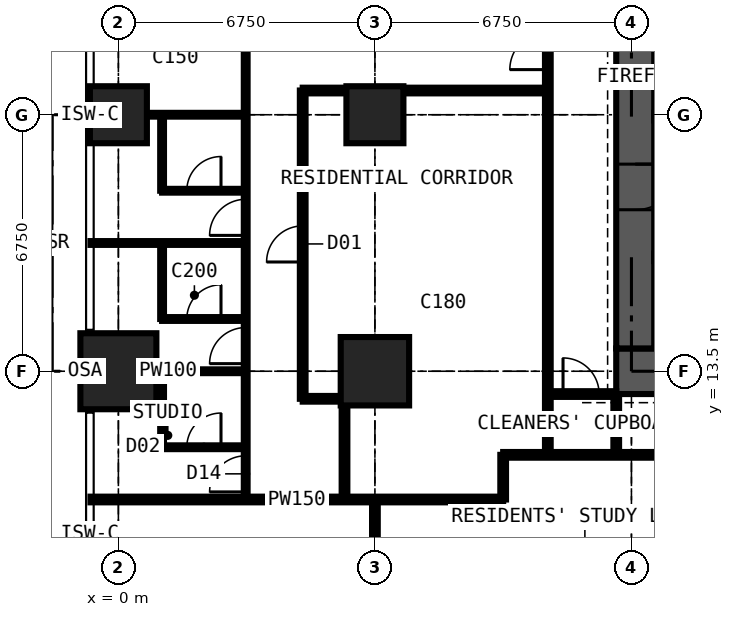
"""IFC4 building model, lengths in metres.
Left out: names, types, materials, properties, quantities, classifications, styles, units other than length and angle.
Written with IfcOpenShell. Run it as: python <this file> out.ifc"""

import sys

from ifc_helpers import new_model, si_unit, direction, frame, frame_2d, origin, origin_2d, place, context, subcontext, project, spatial, rectangle, extrude, element, fill, save


model = new_model("IFC4")
c1 = context("Model", 3, precision=1e-05, world=origin(), true_north=direction((0.0, 1.0)))
c2 = subcontext(c1, "Body", "Model", "MODEL_VIEW")
j1 = project(units=[si_unit("LENGTHUNIT", "METRE"), si_unit("PLANEANGLEUNIT", "RADIAN")], contexts=[c1])
p1 = place(None, origin())
s1 = spatial("IfcSite", under=j1, at=p1, CompositionType="ELEMENT")
p2 = place(p1, origin())
s2 = spatial("IfcBuilding", under=s1, at=p2, CompositionType="ELEMENT")
p3 = place(p2, frame((0.0, 0.0, 145.8)))
s3 = spatial("IfcBuildingStorey", under=s2, at=p3, CompositionType="ELEMENT", Elevation=145.8)
p4 = place(p3, frame((0.0, 13.5, 0.0), z_axis=(0.0, 0.0, 1.0), x_axis=(1.0, 0.0, 0.0)))
e1 = element("IfcColumn", 1, at=p4, inside=s3, PredefinedType="COLUMN", context=c2, shape_type="SweptSolid", body=[
    extrude(rectangle(XDim=2.0, YDim=2.0, at=origin_2d()), origin(), (0.0, 0.0, 1.0), 3.6),
])
p5 = place(p3, frame((0.0, 20.25, 0.0), z_axis=(0.0, 0.0, 1.0), x_axis=(1.0, 0.0, 0.0)))
e2 = element("IfcColumn", 2, at=p5, inside=s3, PredefinedType="COLUMN", context=c2, shape_type="SweptSolid", body=[
    extrude(rectangle(XDim=1.5, YDim=1.5, at=origin_2d()), origin(), (0.0, 0.0, 1.0), 3.6),
])
p6 = place(p3, frame((6.75, 13.5, 0.0), z_axis=(0.0, 0.0, 1.0), x_axis=(1.0, 0.0, 0.0)))
e3 = element("IfcColumn", 3, at=p6, inside=s3, PredefinedType="COLUMN", context=c2, shape_type="SweptSolid", body=[
    extrude(rectangle(XDim=1.8, YDim=1.8, at=origin_2d()), origin(), (0.0, 0.0, 1.0), 3.6),
])
p7 = place(p3, frame((6.75, 20.25, 0.0), z_axis=(0.0, 0.0, 1.0), x_axis=(1.0, 0.0, 0.0)))
e4 = element("IfcColumn", 4, at=p7, inside=s3, PredefinedType="COLUMN", context=c2, shape_type="SweptSolid", body=[
    extrude(rectangle(XDim=1.5, YDim=1.5, at=origin_2d()), origin(), (0.0, 0.0, 1.0), 3.6),
])
p8 = place(p3, frame((13.1, 13.5, 0.0), z_axis=(0.0, 0.0, 1.0), x_axis=(1.0, 0.0, 0.0)))
e5 = element("IfcWall", 5, at=p8, inside=s3, PredefinedType="SHEAR", context=c2, shape_type="SweptSolid", body=[
    extrude(rectangle(XDim=14.3, YDim=1.2, at=frame_2d((7.15, 0.0))), origin(), (0.0, 0.0, 1.0), 3.6),
])
p9 = place(p3, frame((13.6, 26.4, 0.0), z_axis=(0.0, 0.0, 1.0), x_axis=(0.0, -1.0, 0.0)))
e6 = element("IfcWall", 6, at=p9, inside=s3, PredefinedType="SHEAR", context=c2, shape_type="SweptSolid", body=[
    extrude(rectangle(XDim=12.3, YDim=1.0, at=frame_2d((6.15, 0.0))), origin(), (0.0, 0.0, 1.0), 3.6),
])
p10 = place(p9, frame((7.45, 0.0, 0.0)))
e7 = element("IfcOpeningElement", 7, at=p10, cuts=e6, PredefinedType="OPENING", context=c2, shape_type="SweptSolid", body=[
    extrude(rectangle(XDim=1.2, YDim=2.2, at=frame_2d((0.6, 1.1))), frame((0.0, 0.51, 0.0), z_axis=(0.0, -1.0, 0.0), x_axis=(1.0, 0.0, 0.0)), (0.0, 0.0, 1.0), 1.02),
])
p11 = place(p3, frame((-0.734, 10.125, 0.0), z_axis=(0.0, 0.0, 1.0), x_axis=(1.0, 0.0, 0.0)))
e8 = element("IfcWall", 8, at=p11, inside=s3, PredefinedType="PARTITIONING", context=c2, shape_type="SweptSolid", body=[
    extrude(rectangle(XDim=10.859, YDim=0.15, at=frame_2d((5.429, 0.0))), origin(), (0.0, 0.0, 1.0), 3.375),
])
p12 = place(p3, frame((-0.734, 13.5, 0.0), z_axis=(0.0, 0.0, 1.0), x_axis=(1.0, 0.0, 0.0)))
e9 = element("IfcWall", 9, at=p12, inside=s3, PredefinedType="PARTITIONING", context=c2, shape_type="SweptSolid", body=[
    extrude(rectangle(XDim=4.084, YDim=0.1, at=frame_2d((2.042, 0.0))), origin(), (0.0, 0.0, 1.0), 2.61),
])
p13 = place(p3, frame((-0.734, 16.875, 0.0), z_axis=(0.0, 0.0, 1.0), x_axis=(1.0, 0.0, 0.0)))
e10 = element("IfcWall", 10, at=p13, inside=s3, PredefinedType="PARTITIONING", context=c2, shape_type="SweptSolid", body=[
    extrude(rectangle(XDim=4.084, YDim=0.1, at=frame_2d((2.042, 0.0))), origin(), (0.0, 0.0, 1.0), 3.375),
])
p14 = place(p3, frame((-0.734, 20.25, 0.0), z_axis=(0.0, 0.0, 1.0), x_axis=(1.0, 0.0, 0.0)))
e11 = element("IfcWall", 11, at=p14, inside=s3, PredefinedType="PARTITIONING", context=c2, shape_type="SweptSolid", body=[
    extrude(rectangle(XDim=4.084, YDim=0.1, at=frame_2d((2.042, 0.0))), origin(), (0.0, 0.0, 1.0), 2.61),
])
p15 = place(p3, frame((1.15, 11.5, 0.0), z_axis=(0.0, 0.0, 1.0), x_axis=(0.0, 1.0, 0.0)))
e12 = element("IfcWall", 12, at=p15, inside=s3, PredefinedType="PARTITIONING", context=c2, shape_type="SweptSolid", body=[
    extrude(rectangle(XDim=2.0, YDim=0.1, at=frame_2d((1.0, 0.0))), origin(), (0.0, 0.0, 1.0), 3.375),
])
p16 = place(p3, frame((1.15, 11.5, 0.0), z_axis=(0.0, 0.0, 1.0), x_axis=(1.0, 0.0, 0.0)))
e13 = element("IfcWall", 13, at=p16, inside=s3, PredefinedType="PARTITIONING", context=c2, shape_type="SweptSolid", body=[
    extrude(rectangle(XDim=2.2, YDim=0.1, at=frame_2d((1.1, 0.0))), origin(), (0.0, 0.0, 1.0), 3.375),
])
p17 = place(p16, frame((0.65, 0.0, 0.0)))
e14 = element("IfcOpeningElement", 14, at=p17, cuts=e13, PredefinedType="OPENING", context=c2, shape_type="SweptSolid", body=[
    extrude(rectangle(XDim=0.9, YDim=2.2, at=frame_2d((0.45, 1.1))), frame((0.0, 0.06, 0.0), z_axis=(0.0, -1.0, 0.0), x_axis=(1.0, 0.0, 0.0)), (0.0, 0.0, 1.0), 0.12),
])
p18 = place(p3, frame((1.15, 14.875, 0.0), z_axis=(0.0, 0.0, 1.0), x_axis=(0.0, 1.0, 0.0)))
e15 = element("IfcWall", 15, at=p18, inside=s3, PredefinedType="PARTITIONING", context=c2, shape_type="SweptSolid", body=[
    extrude(rectangle(XDim=2.0, YDim=0.1, at=frame_2d((1.0, 0.0))), origin(), (0.0, 0.0, 1.0), 3.375),
])
p19 = place(p3, frame((1.15, 14.875, 0.0), z_axis=(0.0, 0.0, 1.0), x_axis=(1.0, 0.0, 0.0)))
e16 = element("IfcWall", 16, at=p19, inside=s3, PredefinedType="PARTITIONING", context=c2, shape_type="SweptSolid", body=[
    extrude(rectangle(XDim=2.2, YDim=0.1, at=frame_2d((1.1, 0.0))), origin(), (0.0, 0.0, 1.0), 3.375),
])
p20 = place(p19, frame((0.65, 0.0, 0.0)))
e17 = element("IfcOpeningElement", 17, at=p20, cuts=e16, PredefinedType="OPENING", context=c2, shape_type="SweptSolid", body=[
    extrude(rectangle(XDim=0.9, YDim=2.2, at=frame_2d((0.45, 1.1))), frame((0.0, 0.06, 0.0), z_axis=(0.0, -1.0, 0.0), x_axis=(1.0, 0.0, 0.0)), (0.0, 0.0, 1.0), 0.12),
])
p21 = place(p3, frame((1.15, 18.25, 0.0), z_axis=(0.0, 0.0, 1.0), x_axis=(0.0, 1.0, 0.0)))
e18 = element("IfcWall", 18, at=p21, inside=s3, PredefinedType="PARTITIONING", context=c2, shape_type="SweptSolid", body=[
    extrude(rectangle(XDim=2.0, YDim=0.1, at=frame_2d((1.0, 0.0))), origin(), (0.0, 0.0, 1.0), 3.375),
])
p22 = place(p3, frame((1.15, 18.25, 0.0), z_axis=(0.0, 0.0, 1.0), x_axis=(1.0, 0.0, 0.0)))
e19 = element("IfcWall", 19, at=p22, inside=s3, PredefinedType="PARTITIONING", context=c2, shape_type="SweptSolid", body=[
    extrude(rectangle(XDim=2.2, YDim=0.1, at=frame_2d((1.1, 0.0))), origin(), (0.0, 0.0, 1.0), 3.375),
])
p23 = place(p22, frame((0.65, 0.0, 0.0)))
e20 = element("IfcOpeningElement", 20, at=p23, cuts=e19, PredefinedType="OPENING", context=c2, shape_type="SweptSolid", body=[
    extrude(rectangle(XDim=0.9, YDim=2.2, at=frame_2d((0.45, 1.1))), frame((0.0, 0.06, 0.0), z_axis=(0.0, -1.0, 0.0), x_axis=(1.0, 0.0, 0.0)), (0.0, 0.0, 1.0), 0.12),
])
p24 = place(p3, frame((3.35, 10.125, 0.0), z_axis=(0.0, 0.0, 1.0), x_axis=(0.0, 1.0, 0.0)))
e21 = element("IfcWall", 21, at=p24, inside=s3, PredefinedType="PARTITIONING", context=c2, shape_type="SweptSolid", body=[
    extrude(rectangle(XDim=16.875, YDim=0.1, at=frame_2d((8.438, 0.0))), origin(), (0.0, 0.0, 1.0), 3.375),
])
p25 = place(p24, frame((0.2, 0.0, 0.0)))
e22 = element("IfcOpeningElement", 22, at=p25, cuts=e21, PredefinedType="OPENING", context=c2, shape_type="SweptSolid", body=[
    extrude(rectangle(XDim=0.95, YDim=2.2, at=frame_2d((0.475, 1.1))), frame((0.0, 0.06, 0.0), z_axis=(0.0, -1.0, 0.0), x_axis=(1.0, 0.0, 0.0)), (0.0, 0.0, 1.0), 0.12),
])
p26 = place(p24, frame((3.575, 0.0, 0.0)))
e23 = element("IfcOpeningElement", 23, at=p26, cuts=e21, PredefinedType="OPENING", context=c2, shape_type="SweptSolid", body=[
    extrude(rectangle(XDim=0.95, YDim=2.2, at=frame_2d((0.475, 1.1))), frame((0.0, 0.06, 0.0), z_axis=(0.0, -1.0, 0.0), x_axis=(1.0, 0.0, 0.0)), (0.0, 0.0, 1.0), 0.12),
])
p27 = place(p24, frame((6.95, 0.0, 0.0)))
e24 = element("IfcOpeningElement", 24, at=p27, cuts=e21, PredefinedType="OPENING", context=c2, shape_type="SweptSolid", body=[
    extrude(rectangle(XDim=0.95, YDim=2.2, at=frame_2d((0.475, 1.1))), frame((0.0, 0.06, 0.0), z_axis=(0.0, -1.0, 0.0), x_axis=(1.0, 0.0, 0.0)), (0.0, 0.0, 1.0), 0.12),
])
p28 = place(p3, frame((4.85, 12.775, 0.0), z_axis=(0.0, 0.0, 1.0), x_axis=(0.0, 1.0, 0.0)))
e25 = element("IfcWall", 25, at=p28, inside=s3, PredefinedType="PARTITIONING", context=c2, shape_type="SweptSolid", body=[
    extrude(rectangle(XDim=8.113, YDim=0.15, at=frame_2d((4.056, 0.0))), origin(), (0.0, 0.0, 1.0), 3.375),
])
p29 = place(p28, frame((3.6, 0.0, 0.0)))
e26 = element("IfcOpeningElement", 26, at=p29, cuts=e25, PredefinedType="OPENING", context=c2, shape_type="SweptSolid", body=[
    extrude(rectangle(XDim=0.95, YDim=2.2, at=frame_2d((0.475, 1.1))), frame((0.0, 0.085, 0.0), z_axis=(0.0, -1.0, 0.0), x_axis=(1.0, 0.0, 0.0)), (0.0, 0.0, 1.0), 0.17),
])
p30 = place(p3, frame((4.85, 12.775, 0.0), z_axis=(0.0, 0.0, 1.0), x_axis=(1.0, 0.0, 0.0)))
e27 = element("IfcWall", 27, at=p30, inside=s3, PredefinedType="PARTITIONING", context=c2, shape_type="SweptSolid", body=[
    extrude(rectangle(XDim=1.1, YDim=0.15, at=frame_2d((0.55, 0.0))), origin(), (0.0, 0.0, 1.0), 3.375),
])
p31 = place(p3, frame((4.85, 20.887, 0.0), z_axis=(0.0, 0.0, 1.0), x_axis=(1.0, 0.0, 0.0)))
e28 = element("IfcWall", 28, at=p31, inside=s3, PredefinedType="PARTITIONING", context=c2, shape_type="SweptSolid", body=[
    extrude(rectangle(XDim=6.45, YDim=0.15, at=frame_2d((3.225, 0.0))), origin(), (0.0, 0.0, 1.0), 3.375),
])
p32 = place(p3, frame((5.95, 10.125, 0.0), z_axis=(0.0, 0.0, 1.0), x_axis=(0.0, 1.0, 0.0)))
e29 = element("IfcWall", 29, at=p32, inside=s3, PredefinedType="PARTITIONING", context=c2, shape_type="SweptSolid", body=[
    extrude(rectangle(XDim=2.65, YDim=0.15, at=frame_2d((1.325, 0.0))), origin(), (0.0, 0.0, 1.0), 3.375),
])
p33 = place(p3, frame((6.75, 3.35, 0.0), z_axis=(0.0, 0.0, 1.0), x_axis=(0.0, 1.0, 0.0)))
e30 = element("IfcWall", 30, at=p33, inside=s3, PredefinedType="PARTITIONING", context=c2, shape_type="SweptSolid", body=[
    extrude(rectangle(XDim=6.775, YDim=0.15, at=frame_2d((3.387, 0.0))), origin(), (0.0, 0.0, 1.0), 2.877),
])
p34 = place(p3, frame((10.125, 10.125, 0.0), z_axis=(0.0, 0.0, 1.0), x_axis=(0.0, 1.0, 0.0)))
e31 = element("IfcWall", 31, at=p34, inside=s3, PredefinedType="PARTITIONING", context=c2, shape_type="SweptSolid", body=[
    extrude(rectangle(XDim=1.175, YDim=0.15, at=frame_2d((0.587, 0.0))), origin(), (0.0, 0.0, 1.0), 3.375),
])
p35 = place(p3, frame((10.125, 11.3, 0.0), z_axis=(0.0, 0.0, 1.0), x_axis=(1.0, 0.0, 0.0)))
e32 = element("IfcWall", 32, at=p35, inside=s3, PredefinedType="PARTITIONING", context=c2, shape_type="SweptSolid", body=[
    extrude(rectangle(XDim=20.25, YDim=0.15, at=frame_2d((10.125, 0.0))), origin(), (0.0, 0.0, 1.0), 3.375),
])
p36 = place(p35, frame((8.375, 0.0, 0.0)))
e33 = element("IfcOpeningElement", 33, at=p36, cuts=e32, PredefinedType="OPENING", context=c2, shape_type="SweptSolid", body=[
    extrude(rectangle(XDim=1.0, YDim=2.2, at=frame_2d((0.5, 1.1))), frame((0.0, 0.085, 0.0), z_axis=(0.0, -1.0, 0.0), x_axis=(1.0, 0.0, 0.0)), (0.0, 0.0, 1.0), 0.17),
])
p37 = place(p35, frame((10.975, 0.0, 0.0)))
e34 = element("IfcOpeningElement", 34, at=p37, cuts=e32, PredefinedType="OPENING", context=c2, shape_type="SweptSolid", body=[
    extrude(rectangle(XDim=1.0, YDim=2.2, at=frame_2d((0.5, 1.1))), frame((0.0, 0.085, 0.0), z_axis=(0.0, -1.0, 0.0), x_axis=(1.0, 0.0, 0.0)), (0.0, 0.0, 1.0), 0.17),
])
p38 = place(p35, frame((4.875, 0.0, 0.0)))
e35 = element("IfcOpeningElement", 35, at=p38, cuts=e32, PredefinedType="OPENING", context=c2, shape_type="SweptSolid", body=[
    extrude(rectangle(XDim=0.95, YDim=2.2, at=frame_2d((0.475, 1.1))), frame((0.0, 0.085, 0.0), z_axis=(0.0, -1.0, 0.0), x_axis=(1.0, 0.0, 0.0)), (0.0, 0.0, 1.0), 0.17),
])
p39 = place(p3, frame((11.3, 11.3, 0.0), z_axis=(0.0, 0.0, 1.0), x_axis=(0.0, 1.0, 0.0)))
e36 = element("IfcWall", 36, at=p39, inside=s3, PredefinedType="PARTITIONING", context=c2, shape_type="SweptSolid", body=[
    extrude(rectangle(XDim=19.3, YDim=0.15, at=frame_2d((9.65, 0.0))), origin(), (0.0, 0.0, 1.0), 3.375),
])
p40 = place(p39, frame((18.1, 0.0, 0.0)))
e37 = element("IfcOpeningElement", 37, at=p40, cuts=e36, PredefinedType="OPENING", context=c2, shape_type="SweptSolid", body=[
    extrude(rectangle(XDim=1.0, YDim=2.2, at=frame_2d((0.5, 1.1))), frame((0.0, 0.085, 0.0), z_axis=(0.0, -1.0, 0.0), x_axis=(1.0, 0.0, 0.0)), (0.0, 0.0, 1.0), 0.17),
])
p41 = place(p39, frame((10.137, 0.0, 0.0)))
e38 = element("IfcOpeningElement", 38, at=p41, cuts=e36, PredefinedType="OPENING", context=c2, shape_type="SweptSolid", body=[
    extrude(rectangle(XDim=1.0, YDim=2.2, at=frame_2d((0.5, 1.1))), frame((0.0, 0.085, 0.0), z_axis=(0.0, -1.0, 0.0), x_axis=(1.0, 0.0, 0.0)), (0.0, 0.0, 1.0), 0.17),
])
p42 = place(p3, frame((11.3, 12.9, 0.0), z_axis=(0.0, 0.0, 1.0), x_axis=(1.0, 0.0, 0.0)))
e39 = element("IfcWall", 39, at=p42, inside=s3, PredefinedType="PARTITIONING", context=c2, shape_type="SweptSolid", body=[
    extrude(rectangle(XDim=1.8, YDim=0.15, at=frame_2d((0.9, 0.0))), origin(), (0.0, 0.0, 1.0), 2.806),
])
p43 = place(p42, frame((0.4, 0.0, 0.0)))
e40 = element("IfcOpeningElement", 40, at=p43, cuts=e39, PredefinedType="OPENING", context=c2, shape_type="SweptSolid", body=[
    extrude(rectangle(XDim=0.95, YDim=2.2, at=frame_2d((0.475, 1.1))), frame((0.0, 0.085, 0.0), z_axis=(0.0, -1.0, 0.0), x_axis=(1.0, 0.0, 0.0)), (0.0, 0.0, 1.0), 0.17),
])
p44 = place(p3, frame((13.1, 11.3, 0.0), z_axis=(0.0, 0.0, 1.0), x_axis=(0.0, 1.0, 0.0)))
e41 = element("IfcWall", 41, at=p44, inside=s3, PredefinedType="PARTITIONING", context=c2, shape_type="SweptSolid", body=[
    extrude(rectangle(XDim=1.6, YDim=0.15, at=frame_2d((0.8, 0.0))), origin(), (0.0, 0.0, 1.0), 3.375),
])
p45 = place(p10, origin())
e42 = element("IfcDoor", 42, at=p45, inside=s3, OperationType="DOUBLE_DOOR_SINGLE_SWING", PredefinedType="DOOR", context=c2, shape_type="SweptSolid", body=[
    extrude(rectangle(XDim=1.2, YDim=2.2, at=frame_2d((0.6, 1.1))), frame((0.0, 0.025, 0.0), z_axis=(0.0, -1.0, 0.0), x_axis=(1.0, 0.0, 0.0)), (0.0, 0.0, 1.0), 0.05),
])
fill(e7, e42)
p46 = place(p43, origin())
e43 = element("IfcDoor", 43, at=p46, inside=s3, OperationType="SINGLE_SWING_LEFT", PredefinedType="DOOR", context=c2, shape_type="SweptSolid", body=[
    extrude(rectangle(XDim=0.95, YDim=2.2, at=frame_2d((0.475, 1.1))), frame((0.0, 0.025, 0.0), z_axis=(0.0, -1.0, 0.0), x_axis=(1.0, 0.0, 0.0)), (0.0, 0.0, 1.0), 0.05),
])
fill(e40, e43)
p47 = place(p25, origin())
e44 = element("IfcDoor", 44, at=p47, inside=s3, OperationType="SINGLE_SWING_LEFT", PredefinedType="DOOR", context=c2, shape_type="SweptSolid", body=[
    extrude(rectangle(XDim=0.95, YDim=2.2, at=frame_2d((0.475, 1.1))), frame((0.0, 0.025, 0.0), z_axis=(0.0, -1.0, 0.0), x_axis=(1.0, 0.0, 0.0)), (0.0, 0.0, 1.0), 0.05),
])
fill(e22, e44)
p48 = place(p17, origin())
e45 = element("IfcDoor", 45, at=p48, inside=s3, OperationType="SINGLE_SWING_RIGHT", PredefinedType="DOOR", context=c2, shape_type="SweptSolid", body=[
    extrude(rectangle(XDim=0.9, YDim=2.2, at=frame_2d((0.45, 1.1))), frame((0.0, 0.025, 0.0), z_axis=(0.0, -1.0, 0.0), x_axis=(1.0, 0.0, 0.0)), (0.0, 0.0, 1.0), 0.05),
])
fill(e14, e45)
p49 = place(p26, origin())
e46 = element("IfcDoor", 46, at=p49, inside=s3, OperationType="SINGLE_SWING_LEFT", PredefinedType="DOOR", context=c2, shape_type="SweptSolid", body=[
    extrude(rectangle(XDim=0.95, YDim=2.2, at=frame_2d((0.475, 1.1))), frame((0.0, 0.025, 0.0), z_axis=(0.0, -1.0, 0.0), x_axis=(1.0, 0.0, 0.0)), (0.0, 0.0, 1.0), 0.05),
])
fill(e23, e46)
p50 = place(p20, origin())
e47 = element("IfcDoor", 47, at=p50, inside=s3, OperationType="SINGLE_SWING_RIGHT", PredefinedType="DOOR", context=c2, shape_type="SweptSolid", body=[
    extrude(rectangle(XDim=0.9, YDim=2.2, at=frame_2d((0.45, 1.1))), frame((0.0, 0.025, 0.0), z_axis=(0.0, -1.0, 0.0), x_axis=(1.0, 0.0, 0.0)), (0.0, 0.0, 1.0), 0.05),
])
fill(e17, e47)
p51 = place(p27, origin())
e48 = element("IfcDoor", 48, at=p51, inside=s3, OperationType="SINGLE_SWING_LEFT", PredefinedType="DOOR", context=c2, shape_type="SweptSolid", body=[
    extrude(rectangle(XDim=0.95, YDim=2.2, at=frame_2d((0.475, 1.1))), frame((0.0, 0.025, 0.0), z_axis=(0.0, -1.0, 0.0), x_axis=(1.0, 0.0, 0.0)), (0.0, 0.0, 1.0), 0.05),
])
fill(e24, e48)
p52 = place(p23, origin())
e49 = element("IfcDoor", 49, at=p52, inside=s3, OperationType="SINGLE_SWING_RIGHT", PredefinedType="DOOR", context=c2, shape_type="SweptSolid", body=[
    extrude(rectangle(XDim=0.9, YDim=2.2, at=frame_2d((0.45, 1.1))), frame((0.0, 0.025, 0.0), z_axis=(0.0, -1.0, 0.0), x_axis=(1.0, 0.0, 0.0)), (0.0, 0.0, 1.0), 0.05),
])
fill(e20, e49)
p53 = place(p41, origin())
e50 = element("IfcDoor", 50, at=p53, inside=s3, OperationType="SINGLE_SWING_LEFT", PredefinedType="DOOR", context=c2, shape_type="SweptSolid", body=[
    extrude(rectangle(XDim=1.0, YDim=2.2, at=frame_2d((0.5, 1.1))), frame((0.0, 0.025, 0.0), z_axis=(0.0, -1.0, 0.0), x_axis=(1.0, 0.0, 0.0)), (0.0, 0.0, 1.0), 0.05),
])
fill(e38, e50)
p54 = place(p29, origin())
e51 = element("IfcDoor", 51, at=p54, inside=s3, OperationType="SINGLE_SWING_LEFT", PredefinedType="DOOR", context=c2, shape_type="SweptSolid", body=[
    extrude(rectangle(XDim=0.95, YDim=2.2, at=frame_2d((0.475, 1.1))), frame((0.0, 0.025, 0.0), z_axis=(0.0, -1.0, 0.0), x_axis=(1.0, 0.0, 0.0)), (0.0, 0.0, 1.0), 0.05),
])
fill(e26, e51)
save(model, sys.argv[1])
